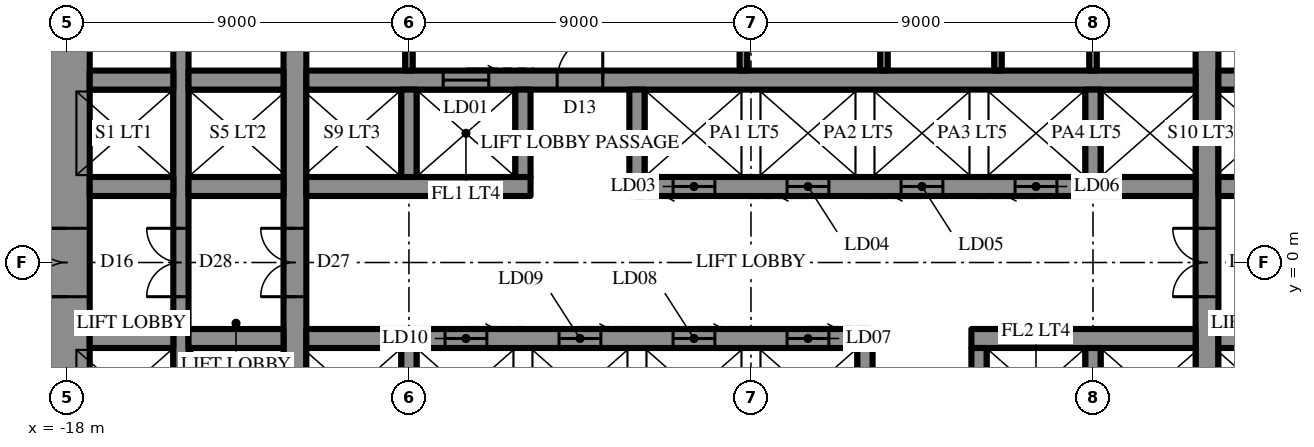
"""IFC4 building model, lengths in metres.
Left out: names, types, materials, properties, quantities, classifications, styles, units other than length and angle.
Written with IfcOpenShell. Run it as: python <this file> out.ifc"""

import sys

from ifc_helpers import new_model, si_unit, direction, frame, frame_2d, origin, place, context, subcontext, project, spatial, rectangle, extrude, element, fill, save


model = new_model("IFC4")
c1 = context("Model", 3, precision=1e-05, world=origin(), true_north=direction((0.0, 1.0)))
c2 = subcontext(c1, "Body", "Model", "MODEL_VIEW")
j1 = project(units=[si_unit("LENGTHUNIT", "METRE"), si_unit("PLANEANGLEUNIT", "RADIAN")], contexts=[c1])
p1 = place(None, origin())
s1 = spatial("IfcSite", under=j1, at=p1, CompositionType="ELEMENT")
p2 = place(p1, origin())
s2 = spatial("IfcBuilding", under=s1, at=p2, CompositionType="ELEMENT")
p3 = place(p2, frame((0.0, 0.0, 7.0)))
s3 = spatial("IfcBuildingStorey", under=s2, at=p3, CompositionType="ELEMENT", Elevation=7.0)
p4 = place(p3, frame((-18.0, 10.7, 0.0), z_axis=(0.0, 0.0, 1.0), x_axis=(0.0, -1.0, 0.0)))
e1 = element("IfcWall", 1, at=p4, inside=s3, PredefinedType="SHEAR", context=c2, shape_type="SweptSolid", body=[
    extrude(rectangle(XDim=21.4, YDim=1.2, at=frame_2d((10.7, 0.0))), origin(), (0.0, 0.0, 1.0), 6.0),
])
p5 = place(p4, frame((9.8, 0.0, 0.0)))
e2 = element("IfcOpeningElement", 2, at=p5, cuts=e1, PredefinedType="OPENING", context=c2, shape_type="SweptSolid", body=[
    extrude(rectangle(XDim=1.8, YDim=2.4, at=frame_2d((0.9, 1.2))), frame((0.0, 0.61, 0.0), z_axis=(0.0, -1.0, 0.0), x_axis=(1.0, 0.0, 0.0)), (0.0, 0.0, 1.0), 1.22),
])
p6 = place(p3, frame((12.0, -10.7, 0.0), z_axis=(0.0, 0.0, 1.0), x_axis=(0.0, 1.0, 0.0)))
e3 = element("IfcWall", 3, at=p6, inside=s3, PredefinedType="SHEAR", context=c2, shape_type="SweptSolid", body=[
    extrude(rectangle(XDim=21.4, YDim=0.6, at=frame_2d((10.7, 0.0))), origin(), (0.0, 0.0, 1.0), 6.0),
])
p7 = place(p6, frame((9.8, 0.0, 0.0)))
e4 = element("IfcOpeningElement", 4, at=p7, cuts=e3, PredefinedType="OPENING", context=c2, shape_type="SweptSolid", body=[
    extrude(rectangle(XDim=1.8, YDim=2.4, at=frame_2d((0.9, 1.2))), frame((0.0, 0.31, 0.0), z_axis=(0.0, -1.0, 0.0), x_axis=(1.0, 0.0, 0.0)), (0.0, 0.0, 1.0), 0.62),
])
p8 = place(p3, frame((-12.0, -10.7, 0.0), z_axis=(0.0, 0.0, 1.0), x_axis=(0.0, 1.0, 0.0)))
e5 = element("IfcWall", 5, at=p8, inside=s3, PredefinedType="SHEAR", context=c2, shape_type="SweptSolid", body=[
    extrude(rectangle(XDim=21.4, YDim=0.6, at=frame_2d((10.7, 0.0))), origin(), (0.0, 0.0, 1.0), 6.0),
])
p9 = place(p8, frame((9.8, 0.0, 0.0)))
e6 = element("IfcOpeningElement", 6, at=p9, cuts=e5, PredefinedType="OPENING", context=c2, shape_type="SweptSolid", body=[
    extrude(rectangle(XDim=1.8, YDim=2.4, at=frame_2d((0.9, 1.2))), frame((0.0, 0.31, 0.0), z_axis=(0.0, -1.0, 0.0), x_axis=(1.0, 0.0, 0.0)), (0.0, 0.0, 1.0), 0.62),
])
p10 = place(p3, frame((-15.0, -10.7, 0.0), z_axis=(0.0, 0.0, 1.0), x_axis=(0.0, 1.0, 0.0)))
e7 = element("IfcWall", 7, at=p10, inside=s3, PredefinedType="SHEAR", context=c2, shape_type="SweptSolid", body=[
    extrude(rectangle(XDim=21.4, YDim=0.4, at=frame_2d((10.7, 0.0))), origin(), (0.0, 0.0, 1.0), 6.0),
])
p11 = place(p10, frame((9.8, 0.0, 0.0)))
e8 = element("IfcOpeningElement", 8, at=p11, cuts=e7, PredefinedType="OPENING", context=c2, shape_type="SweptSolid", body=[
    extrude(rectangle(XDim=1.8, YDim=2.4, at=frame_2d((0.9, 1.2))), frame((0.0, 0.21, 0.0), z_axis=(0.0, -1.0, 0.0), x_axis=(1.0, 0.0, 0.0)), (0.0, 0.0, 1.0), 0.42),
])
p12 = place(p3, frame((-17.4, 2.0, 0.0), z_axis=(0.0, 0.0, 1.0), x_axis=(1.0, 0.0, 0.0)))
e9 = element("IfcWall", 9, at=p12, inside=s3, PredefinedType="SHEAR", context=c2, shape_type="SweptSolid", body=[
    extrude(rectangle(XDim=2.2, YDim=0.5, at=frame_2d((1.1, 0.0))), origin(), (0.0, 0.0, 1.0), 6.0),
])
p13 = place(p3, frame((-14.8, 2.0, 0.0), z_axis=(0.0, 0.0, 1.0), x_axis=(1.0, 0.0, 0.0)))
e10 = element("IfcWall", 10, at=p13, inside=s3, PredefinedType="SHEAR", context=c2, shape_type="SweptSolid", body=[
    extrude(rectangle(XDim=2.5, YDim=0.5, at=frame_2d((1.25, 0.0))), origin(), (0.0, 0.0, 1.0), 6.0),
])
p14 = place(p3, frame((-11.7, 2.0, 0.0), z_axis=(0.0, 0.0, 1.0), x_axis=(1.0, 0.0, 0.0)))
e11 = element("IfcWall", 11, at=p14, inside=s3, PredefinedType="SHEAR", context=c2, shape_type="SweptSolid", body=[
    extrude(rectangle(XDim=5.9, YDim=0.5, at=frame_2d((2.95, 0.0))), origin(), (0.0, 0.0, 1.0), 6.0),
])
p15 = place(p3, frame((-3.2, 2.0, 0.0), z_axis=(0.0, 0.0, 1.0), x_axis=(1.0, 0.0, 0.0)))
e12 = element("IfcWall", 12, at=p15, inside=s3, PredefinedType="SHEAR", context=c2, shape_type="SweptSolid", body=[
    extrude(rectangle(XDim=14.9, YDim=0.5, at=frame_2d((7.45, 0.0))), origin(), (0.0, 0.0, 1.0), 6.0),
])
p16 = place(p15, frame((1.15, 0.0, 0.0)))
e13 = element("IfcOpeningElement", 13, at=p16, cuts=e12, PredefinedType="OPENING", context=c2, shape_type="SweptSolid", body=[
    extrude(rectangle(XDim=1.1, YDim=2.2, at=frame_2d((0.55, 1.1))), frame((0.0, 0.26, 0.0), z_axis=(0.0, -1.0, 0.0), x_axis=(1.0, 0.0, 0.0)), (0.0, 0.0, 1.0), 0.52),
])
p17 = place(p15, frame((4.15, 0.0, 0.0)))
e14 = element("IfcOpeningElement", 14, at=p17, cuts=e12, PredefinedType="OPENING", context=c2, shape_type="SweptSolid", body=[
    extrude(rectangle(XDim=1.1, YDim=2.2, at=frame_2d((0.55, 1.1))), frame((0.0, 0.26, 0.0), z_axis=(0.0, -1.0, 0.0), x_axis=(1.0, 0.0, 0.0)), (0.0, 0.0, 1.0), 0.52),
])
p18 = place(p15, frame((7.15, 0.0, 0.0)))
e15 = element("IfcOpeningElement", 15, at=p18, cuts=e12, PredefinedType="OPENING", context=c2, shape_type="SweptSolid", body=[
    extrude(rectangle(XDim=1.1, YDim=2.2, at=frame_2d((0.55, 1.1))), frame((0.0, 0.26, 0.0), z_axis=(0.0, -1.0, 0.0), x_axis=(1.0, 0.0, 0.0)), (0.0, 0.0, 1.0), 0.52),
])
p19 = place(p15, frame((10.15, 0.0, 0.0)))
e16 = element("IfcOpeningElement", 16, at=p19, cuts=e12, PredefinedType="OPENING", context=c2, shape_type="SweptSolid", body=[
    extrude(rectangle(XDim=1.1, YDim=2.2, at=frame_2d((0.55, 1.1))), frame((0.0, 0.26, 0.0), z_axis=(0.0, -1.0, 0.0), x_axis=(1.0, 0.0, 0.0)), (0.0, 0.0, 1.0), 0.52),
])
p20 = place(p3, frame((12.3, 2.0, 0.0), z_axis=(0.0, 0.0, 1.0), x_axis=(1.0, 0.0, 0.0)))
e17 = element("IfcWall", 17, at=p20, inside=s3, PredefinedType="SHEAR", context=c2, shape_type="SweptSolid", body=[
    extrude(rectangle(XDim=2.5, YDim=0.5, at=frame_2d((1.25, 0.0))), origin(), (0.0, 0.0, 1.0), 6.0),
])
p21 = place(p3, frame((-17.4, 4.8, 0.0), z_axis=(0.0, 0.0, 1.0), x_axis=(1.0, 0.0, 0.0)))
e18 = element("IfcWall", 18, at=p21, inside=s3, PredefinedType="SHEAR", context=c2, shape_type="SweptSolid", body=[
    extrude(rectangle(XDim=2.2, YDim=0.5, at=frame_2d((1.1, 0.0))), origin(), (0.0, 0.0, 1.0), 6.0),
])
p22 = place(p3, frame((-14.8, 4.8, 0.0), z_axis=(0.0, 0.0, 1.0), x_axis=(1.0, 0.0, 0.0)))
e19 = element("IfcWall", 19, at=p22, inside=s3, PredefinedType="SHEAR", context=c2, shape_type="SweptSolid", body=[
    extrude(rectangle(XDim=2.5, YDim=0.5, at=frame_2d((1.25, 0.0))), origin(), (0.0, 0.0, 1.0), 6.0),
])
p23 = place(p3, frame((-11.7, 4.8, 0.0), z_axis=(0.0, 0.0, 1.0), x_axis=(1.0, 0.0, 0.0)))
e20 = element("IfcWall", 20, at=p23, inside=s3, PredefinedType="SHEAR", context=c2, shape_type="SweptSolid", body=[
    extrude(rectangle(XDim=23.4, YDim=0.5, at=frame_2d((11.7, 0.0))), origin(), (0.0, 0.0, 1.0), 6.0),
])
p24 = place(p23, frame((6.6, 0.0, 0.0)))
e21 = element("IfcOpeningElement", 21, at=p24, cuts=e20, PredefinedType="OPENING", context=c2, shape_type="SweptSolid", body=[
    extrude(rectangle(XDim=1.2, YDim=2.2, at=frame_2d((0.6, 1.1))), frame((0.0, 0.26, 0.0), z_axis=(0.0, -1.0, 0.0), x_axis=(1.0, 0.0, 0.0)), (0.0, 0.0, 1.0), 0.52),
])
p25 = place(p23, frame((3.6, 0.0, 0.0)))
e22 = element("IfcOpeningElement", 22, at=p25, cuts=e20, PredefinedType="OPENING", context=c2, shape_type="SweptSolid", body=[
    extrude(rectangle(XDim=1.2, YDim=2.2, at=frame_2d((0.6, 1.1))), frame((0.0, 0.26, 0.0), z_axis=(0.0, -1.0, 0.0), x_axis=(1.0, 0.0, 0.0)), (0.0, 0.0, 1.0), 0.52),
])
p26 = place(p3, frame((12.3, 4.8, 0.0), z_axis=(0.0, 0.0, 1.0), x_axis=(1.0, 0.0, 0.0)))
e23 = element("IfcWall", 23, at=p26, inside=s3, PredefinedType="SHEAR", context=c2, shape_type="SweptSolid", body=[
    extrude(rectangle(XDim=2.5, YDim=0.5, at=frame_2d((1.25, 0.0))), origin(), (0.0, 0.0, 1.0), 6.0),
])
for number, where, z_axis, x_axis in (
    (24, (-9.0, 2.25, 0.0), (0.0, 0.0, 1.0), (0.0, 1.0, 0.0)),
    (25, (-6.0, 2.25, 0.0), (0.0, 0.0, 1.0), (0.0, 1.0, 0.0)),
    (26, (-3.0, 2.25, 0.0), (0.0, 0.0, 1.0), (0.0, 1.0, 0.0)),
    (27, (9.0, 2.25, 0.0), (0.0, 0.0, 1.0), (0.0, 1.0, 0.0)),
):
    element("IfcWall", number, at=place(p3, frame(where, z_axis=z_axis, x_axis=x_axis)), inside=s3, PredefinedType="SHEAR", context=c2, shape_type="SweptSolid", body=[
        extrude(rectangle(XDim=2.3, YDim=0.4, at=frame_2d((1.15, 0.0))), origin(), (0.0, 0.0, 1.0), 6.0),
    ])
p27 = place(p3, frame((-0.2, 5.05, 0.0), z_axis=(0.0, 0.0, 1.0), x_axis=(0.0, 1.0, 0.0)))
e28 = element("IfcWall", 28, at=p27, inside=s3, PredefinedType="SHEAR", context=c2, shape_type="SweptSolid", body=[
    extrude(rectangle(XDim=5.65, YDim=0.2, at=frame_2d((2.825, 0.0))), origin(), (0.0, 0.0, 1.0), 6.0),
])
p28 = place(p3, frame((14.8, -2.0, 0.0), z_axis=(0.0, 0.0, 1.0), x_axis=(-1.0, 0.0, 0.0)))
e29 = element("IfcWall", 29, at=p28, inside=s3, PredefinedType="SHEAR", context=c2, shape_type="SweptSolid", body=[
    extrude(rectangle(XDim=2.5, YDim=0.5, at=frame_2d((1.25, 0.0))), origin(), (0.0, 0.0, 1.0), 6.0),
])
p29 = place(p3, frame((11.7, -2.0, 0.0), z_axis=(0.0, 0.0, 1.0), x_axis=(-1.0, 0.0, 0.0)))
e30 = element("IfcWall", 30, at=p29, inside=s3, PredefinedType="SHEAR", context=c2, shape_type="SweptSolid", body=[
    extrude(rectangle(XDim=5.9, YDim=0.5, at=frame_2d((2.95, 0.0))), origin(), (0.0, 0.0, 1.0), 6.0),
])
p30 = place(p3, frame((3.2, -2.0, 0.0), z_axis=(0.0, 0.0, 1.0), x_axis=(-1.0, 0.0, 0.0)))
e31 = element("IfcWall", 31, at=p30, inside=s3, PredefinedType="SHEAR", context=c2, shape_type="SweptSolid", body=[
    extrude(rectangle(XDim=14.9, YDim=0.5, at=frame_2d((7.45, 0.0))), origin(), (0.0, 0.0, 1.0), 6.0),
])
p31 = place(p30, frame((1.15, 0.0, 0.0)))
e32 = element("IfcOpeningElement", 32, at=p31, cuts=e31, PredefinedType="OPENING", context=c2, shape_type="SweptSolid", body=[
    extrude(rectangle(XDim=1.1, YDim=2.2, at=frame_2d((0.55, 1.1))), frame((0.0, 0.26, 0.0), z_axis=(0.0, -1.0, 0.0), x_axis=(1.0, 0.0, 0.0)), (0.0, 0.0, 1.0), 0.52),
])
p32 = place(p30, frame((4.15, 0.0, 0.0)))
e33 = element("IfcOpeningElement", 33, at=p32, cuts=e31, PredefinedType="OPENING", context=c2, shape_type="SweptSolid", body=[
    extrude(rectangle(XDim=1.1, YDim=2.2, at=frame_2d((0.55, 1.1))), frame((0.0, 0.26, 0.0), z_axis=(0.0, -1.0, 0.0), x_axis=(1.0, 0.0, 0.0)), (0.0, 0.0, 1.0), 0.52),
])
p33 = place(p30, frame((7.15, 0.0, 0.0)))
e34 = element("IfcOpeningElement", 34, at=p33, cuts=e31, PredefinedType="OPENING", context=c2, shape_type="SweptSolid", body=[
    extrude(rectangle(XDim=1.1, YDim=2.2, at=frame_2d((0.55, 1.1))), frame((0.0, 0.26, 0.0), z_axis=(0.0, -1.0, 0.0), x_axis=(1.0, 0.0, 0.0)), (0.0, 0.0, 1.0), 0.52),
])
p34 = place(p30, frame((10.15, 0.0, 0.0)))
e35 = element("IfcOpeningElement", 35, at=p34, cuts=e31, PredefinedType="OPENING", context=c2, shape_type="SweptSolid", body=[
    extrude(rectangle(XDim=1.1, YDim=2.2, at=frame_2d((0.55, 1.1))), frame((0.0, 0.26, 0.0), z_axis=(0.0, -1.0, 0.0), x_axis=(1.0, 0.0, 0.0)), (0.0, 0.0, 1.0), 0.52),
])
p35 = place(p3, frame((-12.3, -2.0, 0.0), z_axis=(0.0, 0.0, 1.0), x_axis=(-1.0, 0.0, 0.0)))
e36 = element("IfcWall", 36, at=p35, inside=s3, PredefinedType="SHEAR", context=c2, shape_type="SweptSolid", body=[
    extrude(rectangle(XDim=2.5, YDim=0.5, at=frame_2d((1.25, 0.0))), origin(), (0.0, 0.0, 1.0), 6.0),
])
p36 = place(p3, frame((-15.2, -2.0, 0.0), z_axis=(0.0, 0.0, 1.0), x_axis=(-1.0, 0.0, 0.0)))
e37 = element("IfcWall", 37, at=p36, inside=s3, PredefinedType="SHEAR", context=c2, shape_type="SweptSolid", body=[
    extrude(rectangle(XDim=2.2, YDim=0.5, at=frame_2d((1.1, 0.0))), origin(), (0.0, 0.0, 1.0), 6.0),
])
for number, where, z_axis, x_axis in (
    (38, (9.0, -2.25, 0.0), (0.0, 0.0, 1.0), (0.0, -1.0, 0.0)),
    (39, (6.0, -2.25, 0.0), (0.0, 0.0, 1.0), (0.0, -1.0, 0.0)),
    (40, (3.0, -2.25, 0.0), (0.0, 0.0, 1.0), (0.0, -1.0, 0.0)),
    (41, (-9.0, -2.25, 0.0), (0.0, 0.0, 1.0), (0.0, -1.0, 0.0)),
):
    element("IfcWall", number, at=place(p3, frame(where, z_axis=z_axis, x_axis=x_axis)), inside=s3, PredefinedType="SHEAR", context=c2, shape_type="SweptSolid", body=[
        extrude(rectangle(XDim=2.3, YDim=0.4, at=frame_2d((1.15, 0.0))), origin(), (0.0, 0.0, 1.0), 6.0),
    ])
for number, where, z_axis, x_axis in (
    (42, (-9.0, 5.05, 0.0), (0.0, 0.0, 1.0), (0.0, 1.0, 0.0)),
    (43, (9.0, 5.05, 0.0), (0.0, 0.0, 1.0), (0.0, 1.0, 0.0)),
    (44, (3.5, 5.05, 0.0), (0.0, 0.0, 1.0), (0.0, 1.0, 0.0)),
    (45, (6.5, 5.05, 0.0), (0.0, 0.0, 1.0), (0.0, 1.0, 0.0)),
):
    element("IfcWall", number, at=place(p3, frame(where, z_axis=z_axis, x_axis=x_axis)), inside=s3, PredefinedType="PARTITIONING", context=c2, shape_type="SweptSolid", body=[
        extrude(rectangle(XDim=5.65, YDim=0.2, at=frame_2d((2.825, 0.0))), origin(), (0.0, 0.0, 1.0), 5.65),
    ])
p37 = place(p5, frame((1.8, 0.0, 0.0), z_axis=(0.0, 0.0, 1.0), x_axis=(-1.0, 0.0, 0.0)))
e46 = element("IfcDoor", 46, at=p37, inside=s3, OperationType="DOUBLE_DOOR_SINGLE_SWING", PredefinedType="DOOR", context=c2, shape_type="SweptSolid", body=[
    extrude(rectangle(XDim=1.8, YDim=2.4, at=frame_2d((0.9, 1.2))), frame((0.0, 0.025, 0.0), z_axis=(0.0, -1.0, 0.0), x_axis=(1.0, 0.0, 0.0)), (0.0, 0.0, 1.0), 0.05),
])
fill(e2, e46)
p38 = place(p24, origin())
e47 = element("IfcDoor", 47, at=p38, inside=s3, OperationType="SINGLE_SWING_LEFT", PredefinedType="DOOR", context=c2, shape_type="SweptSolid", body=[
    extrude(rectangle(XDim=1.2, YDim=2.2, at=frame_2d((0.6, 1.1))), frame((0.0, 0.025, 0.0), z_axis=(0.0, -1.0, 0.0), x_axis=(1.0, 0.0, 0.0)), (0.0, 0.0, 1.0), 0.05),
])
fill(e21, e47)
p39 = place(p7, origin())
e48 = element("IfcDoor", 48, at=p39, inside=s3, OperationType="DOUBLE_DOOR_SINGLE_SWING", PredefinedType="DOOR", context=c2, shape_type="SweptSolid", body=[
    extrude(rectangle(XDim=1.8, YDim=2.4, at=frame_2d((0.9, 1.2))), frame((0.0, 0.025, 0.0), z_axis=(0.0, -1.0, 0.0), x_axis=(1.0, 0.0, 0.0)), (0.0, 0.0, 1.0), 0.05),
])
fill(e4, e48)
p40 = place(p9, origin())
e49 = element("IfcDoor", 49, at=p40, inside=s3, OperationType="DOUBLE_DOOR_SINGLE_SWING", PredefinedType="DOOR", context=c2, shape_type="SweptSolid", body=[
    extrude(rectangle(XDim=1.8, YDim=2.4, at=frame_2d((0.9, 1.2))), frame((0.0, 0.025, 0.0), z_axis=(0.0, -1.0, 0.0), x_axis=(1.0, 0.0, 0.0)), (0.0, 0.0, 1.0), 0.05),
])
fill(e6, e49)
p41 = place(p11, origin())
e50 = element("IfcDoor", 50, at=p41, inside=s3, OperationType="DOUBLE_DOOR_SINGLE_SWING", PredefinedType="DOOR", context=c2, shape_type="SweptSolid", body=[
    extrude(rectangle(XDim=1.8, YDim=2.4, at=frame_2d((0.9, 1.2))), frame((0.0, 0.025, 0.0), z_axis=(0.0, -1.0, 0.0), x_axis=(1.0, 0.0, 0.0)), (0.0, 0.0, 1.0), 0.05),
])
fill(e8, e50)
p42 = place(p25, origin())
e51 = element("IfcDoor", 51, at=p42, inside=s3, OperationType="SLIDING_TO_LEFT", PredefinedType="DOOR", context=c2, shape_type="SweptSolid", body=[
    extrude(rectangle(XDim=1.2, YDim=2.2, at=frame_2d((0.6, 1.1))), frame((0.0, 0.025, 0.0), z_axis=(0.0, -1.0, 0.0), x_axis=(1.0, 0.0, 0.0)), (0.0, 0.0, 1.0), 0.05),
])
fill(e22, e51)
p43 = place(p16, frame((1.1, 0.0, 0.0), z_axis=(0.0, 0.0, 1.0), x_axis=(-1.0, 0.0, 0.0)))
e52 = element("IfcDoor", 52, at=p43, inside=s3, OperationType="SLIDING_TO_LEFT", PredefinedType="DOOR", context=c2, shape_type="SweptSolid", body=[
    extrude(rectangle(XDim=1.1, YDim=2.2, at=frame_2d((0.55, 1.1))), frame((0.0, 0.025, 0.0), z_axis=(0.0, -1.0, 0.0), x_axis=(1.0, 0.0, 0.0)), (0.0, 0.0, 1.0), 0.05),
])
fill(e13, e52)
p44 = place(p17, frame((1.1, 0.0, 0.0), z_axis=(0.0, 0.0, 1.0), x_axis=(-1.0, 0.0, 0.0)))
e53 = element("IfcDoor", 53, at=p44, inside=s3, OperationType="SLIDING_TO_LEFT", PredefinedType="DOOR", context=c2, shape_type="SweptSolid", body=[
    extrude(rectangle(XDim=1.1, YDim=2.2, at=frame_2d((0.55, 1.1))), frame((0.0, 0.025, 0.0), z_axis=(0.0, -1.0, 0.0), x_axis=(1.0, 0.0, 0.0)), (0.0, 0.0, 1.0), 0.05),
])
fill(e14, e53)
p45 = place(p18, frame((1.1, 0.0, 0.0), z_axis=(0.0, 0.0, 1.0), x_axis=(-1.0, 0.0, 0.0)))
e54 = element("IfcDoor", 54, at=p45, inside=s3, OperationType="SLIDING_TO_LEFT", PredefinedType="DOOR", context=c2, shape_type="SweptSolid", body=[
    extrude(rectangle(XDim=1.1, YDim=2.2, at=frame_2d((0.55, 1.1))), frame((0.0, 0.025, 0.0), z_axis=(0.0, -1.0, 0.0), x_axis=(1.0, 0.0, 0.0)), (0.0, 0.0, 1.0), 0.05),
])
fill(e15, e54)
p46 = place(p19, frame((1.1, 0.0, 0.0), z_axis=(0.0, 0.0, 1.0), x_axis=(-1.0, 0.0, 0.0)))
e55 = element("IfcDoor", 55, at=p46, inside=s3, OperationType="SLIDING_TO_LEFT", PredefinedType="DOOR", context=c2, shape_type="SweptSolid", body=[
    extrude(rectangle(XDim=1.1, YDim=2.2, at=frame_2d((0.55, 1.1))), frame((0.0, 0.025, 0.0), z_axis=(0.0, -1.0, 0.0), x_axis=(1.0, 0.0, 0.0)), (0.0, 0.0, 1.0), 0.05),
])
fill(e16, e55)
p47 = place(p31, frame((1.1, 0.0, 0.0), z_axis=(0.0, 0.0, 1.0), x_axis=(-1.0, 0.0, 0.0)))
e56 = element("IfcDoor", 56, at=p47, inside=s3, OperationType="SLIDING_TO_LEFT", PredefinedType="DOOR", context=c2, shape_type="SweptSolid", body=[
    extrude(rectangle(XDim=1.1, YDim=2.2, at=frame_2d((0.55, 1.1))), frame((0.0, 0.025, 0.0), z_axis=(0.0, -1.0, 0.0), x_axis=(1.0, 0.0, 0.0)), (0.0, 0.0, 1.0), 0.05),
])
fill(e32, e56)
p48 = place(p32, frame((1.1, 0.0, 0.0), z_axis=(0.0, 0.0, 1.0), x_axis=(-1.0, 0.0, 0.0)))
e57 = element("IfcDoor", 57, at=p48, inside=s3, OperationType="SLIDING_TO_LEFT", PredefinedType="DOOR", context=c2, shape_type="SweptSolid", body=[
    extrude(rectangle(XDim=1.1, YDim=2.2, at=frame_2d((0.55, 1.1))), frame((0.0, 0.025, 0.0), z_axis=(0.0, -1.0, 0.0), x_axis=(1.0, 0.0, 0.0)), (0.0, 0.0, 1.0), 0.05),
])
fill(e33, e57)
p49 = place(p33, frame((1.1, 0.0, 0.0), z_axis=(0.0, 0.0, 1.0), x_axis=(-1.0, 0.0, 0.0)))
e58 = element("IfcDoor", 58, at=p49, inside=s3, OperationType="SLIDING_TO_LEFT", PredefinedType="DOOR", context=c2, shape_type="SweptSolid", body=[
    extrude(rectangle(XDim=1.1, YDim=2.2, at=frame_2d((0.55, 1.1))), frame((0.0, 0.025, 0.0), z_axis=(0.0, -1.0, 0.0), x_axis=(1.0, 0.0, 0.0)), (0.0, 0.0, 1.0), 0.05),
])
fill(e34, e58)
p50 = place(p34, frame((1.1, 0.0, 0.0), z_axis=(0.0, 0.0, 1.0), x_axis=(-1.0, 0.0, 0.0)))
e59 = element("IfcDoor", 59, at=p50, inside=s3, OperationType="SLIDING_TO_LEFT", PredefinedType="DOOR", context=c2, shape_type="SweptSolid", body=[
    extrude(rectangle(XDim=1.1, YDim=2.2, at=frame_2d((0.55, 1.1))), frame((0.0, 0.025, 0.0), z_axis=(0.0, -1.0, 0.0), x_axis=(1.0, 0.0, 0.0)), (0.0, 0.0, 1.0), 0.05),
])
fill(e35, e59)
save(model, sys.argv[1])
